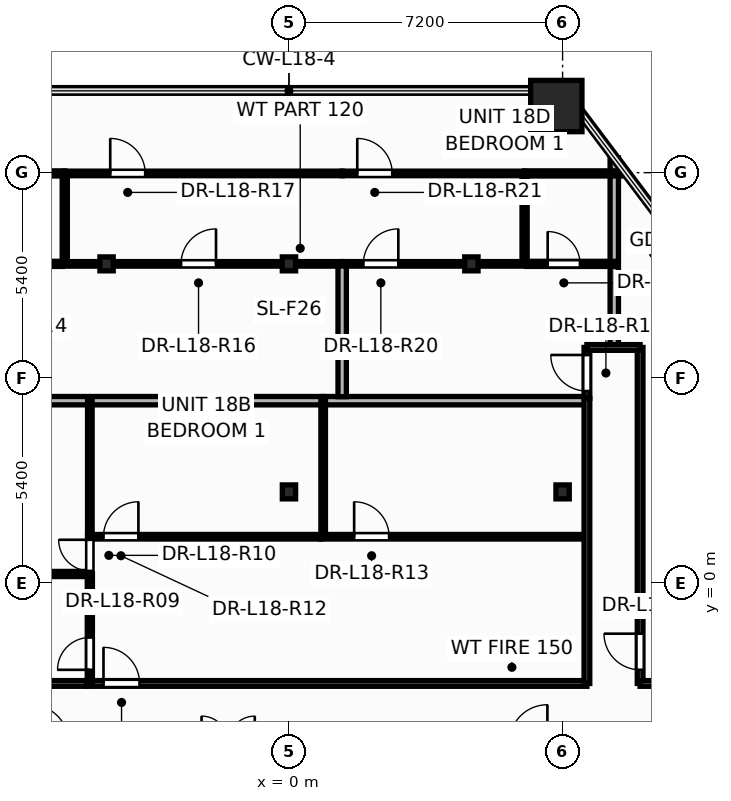
"""IFC4 building model, lengths in metres.
Left out: names, types, materials, properties, quantities, classifications, styles, units other than length and angle.
Written with IfcOpenShell. Run it as: python <this file> out.ifc"""

import sys

from ifc_helpers import new_model, si_unit, direction, frame, frame_2d, origin, origin_2d, place, context, subcontext, project, spatial, rectangle, hollow_rectangle, i_section, extrude, element, fill, save


model = new_model("IFC4")
c1 = context("Model", 3, precision=1e-05, world=origin(), true_north=direction((0.0, 1.0)))
c2 = subcontext(c1, "Body", "Model", "MODEL_VIEW")
j1 = project(units=[si_unit("LENGTHUNIT", "METRE"), si_unit("PLANEANGLEUNIT", "RADIAN")], contexts=[c1])
p1 = place(None, origin())
s1 = spatial("IfcSite", under=j1, at=p1, CompositionType="ELEMENT")
p2 = place(p1, origin())
s2 = spatial("IfcBuilding", under=s1, at=p2, CompositionType="ELEMENT")
p3 = place(p2, frame((0.0, 0.0, 72.0)))
s3 = spatial("IfcBuildingStorey", under=s2, at=p3, CompositionType="ELEMENT", Elevation=72.0)
p4 = place(p3, frame((7.034, 12.553, 0.0), z_axis=(0.0, 0.0, 1.0), x_axis=(1.0, 0.0, 0.0)))
e1 = element("IfcColumn", 1, at=p4, inside=s3, PredefinedType="COLUMN", context=c2, shape_type="SweptSolid", body=[
    extrude(hollow_rectangle(XDim=1.35, YDim=1.35, WallThickness=0.065, at=origin_2d()), origin(), (0.0, 0.0, 1.0), 3.6),
])
for number, where, z_axis, x_axis in (
    (2, (0.0, 2.4, 0.0), (0.0, 0.0, 1.0), (1.0, 0.0, 0.0)),
    (3, (7.2, 2.4, 0.0), (0.0, 0.0, 1.0), (1.0, 0.0, 0.0)),
    (4, (-4.8, 8.4, 0.0), (0.0, 0.0, 1.0), (1.0, 0.0, 0.0)),
    (5, (0.0, 8.4, 0.0), (0.0, 0.0, 1.0), (1.0, 0.0, 0.0)),
    (6, (4.8, 8.4, 0.0), (0.0, 0.0, 1.0), (1.0, 0.0, 0.0)),
):
    element("IfcColumn", number, at=place(p3, frame(where, z_axis=z_axis, x_axis=x_axis)), inside=s3, PredefinedType="COLUMN", context=c2, shape_type="SweptSolid", body=[
        extrude(i_section(OverallWidth=0.35, OverallDepth=0.367, WebThickness=0.025, FlangeThickness=0.032, at=origin_2d()), origin(), (0.0, 0.0, 1.0), 3.6),
    ])
p5 = place(p3, frame((-5.32, -2.64, 0.0), z_axis=(0.0, 0.0, 1.0), x_axis=(1.0, 0.0, 0.0)))
e7 = element("IfcWall", 7, at=p5, inside=s3, PredefinedType="PARTITIONING", context=c2, shape_type="SweptSolid", body=[
    extrude(rectangle(XDim=13.16, YDim=0.15, at=frame_2d((6.58, 0.0))), origin(), (0.0, 0.0, 1.0), 2.325),
])
p6 = place(p5, frame((0.439, 0.0, 0.0)))
e8 = element("IfcOpeningElement", 8, at=p6, cuts=e7, PredefinedType="OPENING", context=c2, shape_type="SweptSolid", body=[
    extrude(rectangle(XDim=0.956, YDim=2.104, at=frame_2d((0.475, 1.052))), frame((0.0, 0.085, 0.0), z_axis=(0.0, -1.0, 0.0), x_axis=(1.0, 0.0, 0.0)), (0.0, 0.0, 1.0), 0.17),
])
p7 = place(p3, frame((9.24, -2.64, 0.0), z_axis=(0.0, 0.0, 1.0), x_axis=(0.0, 1.0, 0.0)))
e9 = element("IfcWall", 9, at=p7, inside=s3, PredefinedType="PARTITIONING", context=c2, shape_type="SweptSolid", body=[
    extrude(rectangle(XDim=8.84, YDim=0.15, at=frame_2d((4.42, 0.0))), origin(), (0.0, 0.0, 1.0), 2.509),
])
p8 = place(p7, frame((0.359, 0.0, 0.0)))
e10 = element("IfcOpeningElement", 10, at=p8, cuts=e9, PredefinedType="OPENING", context=c2, shape_type="SweptSolid", body=[
    extrude(rectangle(XDim=0.956, YDim=2.104, at=frame_2d((0.475, 1.052))), frame((0.0, 0.085, 0.0), z_axis=(0.0, -1.0, 0.0), x_axis=(1.0, 0.0, 0.0)), (0.0, 0.0, 1.0), 0.17),
])
p9 = place(p3, frame((-5.96, 8.4, 0.0), z_axis=(0.0, 0.0, 1.0), x_axis=(1.0, 0.0, 0.0)))
e11 = element("IfcWall", 11, at=p9, inside=s3, PredefinedType="PARTITIONING", context=c2, shape_type="SweptSolid", body=[
    extrude(rectangle(XDim=7.36, YDim=0.12, at=frame_2d((3.68, 0.0))), origin(), (0.0, 0.0, 1.0), 2.325),
])
p10 = place(p9, frame((3.12, 0.0, 0.0)))
e12 = element("IfcOpeningElement", 12, at=p10, cuts=e11, PredefinedType="OPENING", context=c2, shape_type="SweptSolid", body=[
    extrude(rectangle(XDim=0.926, YDim=2.104, at=frame_2d((0.46, 1.052))), frame((0.0, 0.07, 0.0), z_axis=(0.0, -1.0, 0.0), x_axis=(1.0, 0.0, 0.0)), (0.0, 0.0, 1.0), 0.14),
])
p11 = place(p3, frame((-5.9, 10.78, 0.0), z_axis=(0.0, 0.0, 1.0), x_axis=(1.0, 0.0, 0.0)))
e13 = element("IfcWall", 13, at=p11, inside=s3, PredefinedType="PARTITIONING", context=c2, shape_type="SweptSolid", body=[
    extrude(rectangle(XDim=7.3, YDim=0.12, at=frame_2d((3.65, 0.0))), origin(), (0.0, 0.0, 1.0), 2.509),
])
p12 = place(p11, frame((1.197, 0.0, 0.0)))
e14 = element("IfcOpeningElement", 14, at=p12, cuts=e13, PredefinedType="OPENING", context=c2, shape_type="SweptSolid", body=[
    extrude(rectangle(XDim=0.926, YDim=2.104, at=frame_2d((0.46, 1.052))), frame((0.0, 0.07, 0.0), z_axis=(0.0, -1.0, 0.0), x_axis=(1.0, 0.0, 0.0)), (0.0, 0.0, 1.0), 0.14),
])
p13 = place(p3, frame((0.84, 1.22, 0.0), z_axis=(0.0, 0.0, 1.0), x_axis=(1.0, 0.0, 0.0)))
e15 = element("IfcWall", 15, at=p13, inside=s3, PredefinedType="PARTITIONING", context=c2, shape_type="SweptSolid", body=[
    extrude(rectangle(XDim=7.0, YDim=0.12, at=frame_2d((3.5, 0.0))), origin(), (0.0, 0.0, 1.0), 2.325),
])
p14 = place(p13, frame((0.875, 0.0, 0.0)))
e16 = element("IfcOpeningElement", 16, at=p14, cuts=e15, PredefinedType="OPENING", context=c2, shape_type="SweptSolid", body=[
    extrude(rectangle(XDim=0.926, YDim=2.104, at=frame_2d((0.46, 1.052))), frame((0.0, 0.07, 0.0), z_axis=(0.0, -1.0, 0.0), x_axis=(1.0, 0.0, 0.0)), (0.0, 0.0, 1.0), 0.14),
])
p15 = place(p3, frame((0.9, 4.8, 0.0), z_axis=(0.0, 0.0, 1.0), x_axis=(1.0, 0.0, 0.0)))
e17 = element("IfcWall", 17, at=p15, inside=s3, PredefinedType="PARTITIONING", context=c2, shape_type="SweptSolid", body=[
    extrude(rectangle(XDim=6.94, YDim=0.22, at=frame_2d((3.47, 0.0))), origin(), (0.0, 0.0, 1.0), 2.509),
])
p16 = place(p3, frame((-5.24, 1.22, 0.0), z_axis=(0.0, 0.0, 1.0), x_axis=(1.0, 0.0, 0.0)))
e18 = element("IfcWall", 18, at=p16, inside=s3, PredefinedType="PARTITIONING", context=c2, shape_type="SweptSolid", body=[
    extrude(rectangle(XDim=6.078, YDim=0.12, at=frame_2d((3.039, 0.0))), origin(), (0.0, 0.0, 1.0), 2.325),
])
p17 = place(p16, frame((0.358, 0.0, 0.0)))
e19 = element("IfcOpeningElement", 19, at=p17, cuts=e18, PredefinedType="OPENING", context=c2, shape_type="SweptSolid", body=[
    extrude(rectangle(XDim=0.926, YDim=2.104, at=frame_2d((0.46, 1.052))), frame((0.0, 0.07, 0.0), z_axis=(0.0, -1.0, 0.0), x_axis=(1.0, 0.0, 0.0)), (0.0, 0.0, 1.0), 0.14),
])
p18 = place(p3, frame((-7.84, 4.8, 0.0), z_axis=(0.0, 0.0, 1.0), x_axis=(1.0, 0.0, 0.0)))
e20 = element("IfcWall", 20, at=p18, inside=s3, PredefinedType="PARTITIONING", context=c2, shape_type="SweptSolid", body=[
    extrude(rectangle(XDim=8.74, YDim=0.22, at=frame_2d((4.37, 0.0))), origin(), (0.0, 0.0, 1.0), 2.325),
])
p19 = place(p3, frame((9.24, -2.64, 0.0), z_axis=(0.0, 0.0, 1.0), x_axis=(1.0, 0.0, 0.0)))
e21 = element("IfcWall", 21, at=p19, inside=s3, PredefinedType="PARTITIONING", context=c2, shape_type="SweptSolid", body=[
    extrude(rectangle(XDim=5.4, YDim=0.15, at=frame_2d((2.7, 0.0))), origin(), (0.0, 0.0, 1.0), 3.35),
])
p20 = place(p3, frame((1.4, 8.4, 0.0), z_axis=(0.0, 0.0, 1.0), x_axis=(1.0, 0.0, 0.0)))
e22 = element("IfcWall", 22, at=p20, inside=s3, PredefinedType="PARTITIONING", context=c2, shape_type="SweptSolid", body=[
    extrude(rectangle(XDim=4.86, YDim=0.12, at=frame_2d((2.43, 0.0))), origin(), (0.0, 0.0, 1.0), 2.509),
])
p21 = place(p20, frame((0.558, 0.0, 0.0)))
e23 = element("IfcOpeningElement", 23, at=p21, cuts=e22, PredefinedType="OPENING", context=c2, shape_type="SweptSolid", body=[
    extrude(rectangle(XDim=0.926, YDim=2.104, at=frame_2d((0.46, 1.052))), frame((0.0, 0.07, 0.0), z_axis=(0.0, -1.0, 0.0), x_axis=(1.0, 0.0, 0.0)), (0.0, 0.0, 1.0), 0.14),
])
p22 = place(p3, frame((1.4, 10.78, 0.0), z_axis=(0.0, 0.0, 1.0), x_axis=(1.0, 0.0, 0.0)))
e24 = element("IfcWall", 24, at=p22, inside=s3, PredefinedType="PARTITIONING", context=c2, shape_type="SweptSolid", body=[
    extrude(rectangle(XDim=4.8, YDim=0.12, at=frame_2d((2.4, 0.0))), origin(), (0.0, 0.0, 1.0), 2.509),
])
p23 = place(p22, frame((0.397, 0.0, 0.0)))
e25 = element("IfcOpeningElement", 25, at=p23, cuts=e24, PredefinedType="OPENING", context=c2, shape_type="SweptSolid", body=[
    extrude(rectangle(XDim=0.926, YDim=2.104, at=frame_2d((0.46, 1.052))), frame((0.0, 0.07, 0.0), z_axis=(0.0, -1.0, 0.0), x_axis=(1.0, 0.0, 0.0)), (0.0, 0.0, 1.0), 0.14),
])
p24 = place(p3, frame((7.84, -2.64, 0.0), z_axis=(0.0, 0.0, 1.0), x_axis=(0.0, 1.0, 0.0)))
e26 = element("IfcWall", 26, at=p24, inside=s3, PredefinedType="PARTITIONING", context=c2, shape_type="SweptSolid", body=[
    extrude(rectangle(XDim=7.5, YDim=0.15, at=frame_2d((3.75, 0.0))), origin(), (0.0, 0.0, 1.0), 2.509),
])
p25 = place(p3, frame((-5.24, 1.16, 0.0), z_axis=(0.0, 0.0, 1.0), x_axis=(0.0, 1.0, 0.0)))
e27 = element("IfcWall", 27, at=p25, inside=s3, PredefinedType="PARTITIONING", context=c2, shape_type="SweptSolid", body=[
    extrude(rectangle(XDim=3.64, YDim=0.12, at=frame_2d((1.82, 0.0))), origin(), (0.0, 0.0, 1.0), 2.325),
])
p26 = place(p3, frame((1.4, 4.905, 0.0), z_axis=(0.0, 0.0, 1.0), x_axis=(0.0, 1.0, 0.0)))
e28 = element("IfcWall", 28, at=p26, inside=s3, PredefinedType="PARTITIONING", context=c2, shape_type="SweptSolid", body=[
    extrude(rectangle(XDim=3.44, YDim=0.22, at=frame_2d((1.72, 0.0))), origin(), (0.0, 0.0, 1.0), 2.509),
])
p27 = place(p3, frame((0.9, 1.22, 0.0), z_axis=(0.0, 0.0, 1.0), x_axis=(0.0, 1.0, 0.0)))
e29 = element("IfcWall", 29, at=p27, inside=s3, PredefinedType="PARTITIONING", context=c2, shape_type="SweptSolid", body=[
    extrude(rectangle(XDim=3.58, YDim=0.12, at=frame_2d((1.79, 0.0))), origin(), (0.0, 0.0, 1.0), 2.325),
])
p28 = place(p3, frame((-8.869, 10.78, 0.0), z_axis=(0.0, 0.0, 1.0), x_axis=(1.0, 0.0, 0.0)))
e30 = element("IfcWall", 30, at=p28, inside=s3, PredefinedType="PARTITIONING", context=c2, shape_type="SweptSolid", body=[
    extrude(rectangle(XDim=2.969, YDim=0.135, at=frame_2d((1.484, 0.0))), origin(), (0.0, 0.0, 1.0), 2.509),
])
p29 = place(p3, frame((-5.24, -2.64, 0.0), z_axis=(0.0, 0.0, 1.0), x_axis=(0.0, 1.0, 0.0)))
e31 = element("IfcWall", 31, at=p29, inside=s3, PredefinedType="PARTITIONING", context=c2, shape_type="SweptSolid", body=[
    extrude(rectangle(XDim=2.88, YDim=0.135, at=frame_2d((1.44, 0.0))), origin(), (0.0, 0.0, 1.0), 3.35),
])
p30 = place(p29, frame((0.359, 0.0, 0.0)))
e32 = element("IfcOpeningElement", 32, at=p30, cuts=e31, PredefinedType="OPENING", context=c2, shape_type="SweptSolid", body=[
    extrude(rectangle(XDim=0.856, YDim=2.104, at=frame_2d((0.425, 1.052))), frame((0.0, 0.078, 0.0), z_axis=(0.0, -1.0, 0.0), x_axis=(1.0, 0.0, 0.0)), (0.0, 0.0, 1.0), 0.155),
])
p31 = place(p3, frame((8.56, 6.2, 0.0), z_axis=(0.0, 0.0, 1.0), x_axis=(0.0, 1.0, 0.0)))
e33 = element("IfcWall", 33, at=p31, inside=s3, PredefinedType="PARTITIONING", context=c2, shape_type="SweptSolid", body=[
    extrude(rectangle(XDim=4.991, YDim=0.22, at=frame_2d((2.495, 0.0))), origin(), (0.0, 0.0, 1.0), 2.509),
])
p32 = place(p3, frame((-8.56, 8.4, 0.0), z_axis=(0.0, 0.0, 1.0), x_axis=(1.0, 0.0, 0.0)))
e34 = element("IfcWall", 34, at=p32, inside=s3, PredefinedType="PARTITIONING", context=c2, shape_type="SweptSolid", body=[
    extrude(rectangle(XDim=2.598, YDim=0.135, at=frame_2d((1.299, 0.0))), origin(), (0.0, 0.0, 1.0), 3.35),
])
p33 = place(p32, frame((0.398, 0.0, 0.0)))
e35 = element("IfcOpeningElement", 35, at=p33, cuts=e34, PredefinedType="OPENING", context=c2, shape_type="SweptSolid", body=[
    extrude(rectangle(XDim=0.856, YDim=2.104, at=frame_2d((0.425, 1.052))), frame((0.0, 0.078, 0.0), z_axis=(0.0, -1.0, 0.0), x_axis=(1.0, 0.0, 0.0)), (0.0, 0.0, 1.0), 0.155),
])
p34 = place(p3, frame((6.2, 10.78, 0.0), z_axis=(0.0, 0.0, 1.0), x_axis=(1.0, 0.0, 0.0)))
e36 = element("IfcWall", 36, at=p34, inside=s3, PredefinedType="PARTITIONING", context=c2, shape_type="SweptSolid", body=[
    extrude(rectangle(XDim=2.669, YDim=0.135, at=frame_2d((1.334, 0.0))), origin(), (0.0, 0.0, 1.0), 2.509),
])
p35 = place(p3, frame((-7.84, -2.64, 0.0), z_axis=(0.0, 0.0, 1.0), x_axis=(1.0, 0.0, 0.0)))
e37 = element("IfcWall", 37, at=p35, inside=s3, PredefinedType="PARTITIONING", context=c2, shape_type="SweptSolid", body=[
    extrude(rectangle(XDim=2.518, YDim=0.15, at=frame_2d((1.259, 0.0))), origin(), (0.0, 0.0, 1.0), 2.325),
])
p36 = place(p3, frame((-7.84, 0.24, 0.0), z_axis=(0.0, 0.0, 1.0), x_axis=(1.0, 0.0, 0.0)))
e38 = element("IfcWall", 38, at=p36, inside=s3, PredefinedType="PARTITIONING", context=c2, shape_type="SweptSolid", body=[
    extrude(rectangle(XDim=2.6, YDim=0.135, at=frame_2d((1.3, 0.0))), origin(), (0.0, 0.0, 1.0), 2.325),
])
p37 = place(p3, frame((6.262, 8.4, 0.0), z_axis=(0.0, 0.0, 1.0), x_axis=(1.0, 0.0, 0.0)))
e39 = element("IfcWall", 39, at=p37, inside=s3, PredefinedType="PARTITIONING", context=c2, shape_type="SweptSolid", body=[
    extrude(rectangle(XDim=2.298, YDim=0.135, at=frame_2d((1.149, 0.0))), origin(), (0.0, 0.0, 1.0), 3.35),
])
p38 = place(p37, frame((0.546, 0.0, 0.0)))
e40 = element("IfcOpeningElement", 40, at=p38, cuts=e39, PredefinedType="OPENING", context=c2, shape_type="SweptSolid", body=[
    extrude(rectangle(XDim=0.856, YDim=2.104, at=frame_2d((0.425, 1.052))), frame((0.0, 0.078, 0.0), z_axis=(0.0, -1.0, 0.0), x_axis=(1.0, 0.0, 0.0)), (0.0, 0.0, 1.0), 0.155),
])
for number, where, z_axis, x_axis in (
    (41, (-5.9, 8.4, 0.0), (0.0, 0.0, 1.0), (0.0, 1.0, 0.0)),
    (42, (6.2, 8.4, 0.0), (0.0, 0.0, 1.0), (0.0, 1.0, 0.0)),
):
    element("IfcWall", number, at=place(p3, frame(where, z_axis=z_axis, x_axis=x_axis)), inside=s3, PredefinedType="PARTITIONING", context=c2, shape_type="SweptSolid", body=[
        extrude(rectangle(XDim=2.38, YDim=0.135, at=frame_2d((1.19, 0.0))), origin(), (0.0, 0.0, 1.0), 2.509),
    ])
p39 = place(p3, frame((7.84, 4.862, 0.0), z_axis=(0.0, 0.0, 1.0), x_axis=(0.0, 1.0, 0.0)))
e43 = element("IfcWall", 43, at=p39, inside=s3, PredefinedType="PARTITIONING", context=c2, shape_type="SweptSolid", body=[
    extrude(rectangle(XDim=1.338, YDim=0.15, at=frame_2d((0.669, 0.0))), origin(), (0.0, 0.0, 1.0), 3.35),
])
p40 = place(p39, frame((0.191, 0.0, 0.0)))
e44 = element("IfcOpeningElement", 44, at=p40, cuts=e43, PredefinedType="OPENING", context=c2, shape_type="SweptSolid", body=[
    extrude(rectangle(XDim=0.956, YDim=2.104, at=frame_2d((0.475, 1.052))), frame((0.0, 0.085, 0.0), z_axis=(0.0, -1.0, 0.0), x_axis=(1.0, 0.0, 0.0)), (0.0, 0.0, 1.0), 0.17),
])
p41 = place(p3, frame((-5.24, 0.24, 0.0), z_axis=(0.0, 0.0, 1.0), x_axis=(0.0, 1.0, 0.0)))
e45 = element("IfcWall", 45, at=p41, inside=s3, PredefinedType="PARTITIONING", context=c2, shape_type="SweptSolid", body=[
    extrude(rectangle(XDim=1.04, YDim=0.12, at=frame_2d((0.52, 0.0))), origin(), (0.0, 0.0, 1.0), 3.35),
])
p42 = place(p41, frame((0.08, 0.0, 0.0)))
e46 = element("IfcOpeningElement", 46, at=p42, cuts=e45, PredefinedType="OPENING", context=c2, shape_type="SweptSolid", body=[
    extrude(rectangle(XDim=0.826, YDim=2.104, at=frame_2d((0.41, 1.052))), frame((0.0, 0.07, 0.0), z_axis=(0.0, -1.0, 0.0), x_axis=(1.0, 0.0, 0.0)), (0.0, 0.0, 1.0), 0.14),
])
p43 = place(p3, frame((7.84, 6.2, 0.0), z_axis=(0.0, 0.0, 1.0), x_axis=(1.0, 0.0, 0.0)))
e47 = element("IfcWall", 47, at=p43, inside=s3, PredefinedType="PARTITIONING", context=c2, shape_type="SweptSolid", body=[
    extrude(rectangle(XDim=1.4, YDim=0.15, at=frame_2d((0.7, 0.0))), origin(), (0.0, 0.0, 1.0), 3.35),
])
p44 = place(p30, origin())
e48 = element("IfcDoor", 48, at=p44, inside=s3, OperationType="SINGLE_SWING_LEFT", PredefinedType="DOOR", context=c2, shape_type="SweptSolid", body=[
    extrude(rectangle(XDim=0.85, YDim=2.1, at=frame_2d((0.425, 1.05))), frame((0.0, 0.025, 0.0), z_axis=(0.0, -1.0, 0.0), x_axis=(1.0, 0.0, 0.0)), (0.0, 0.0, 1.0), 0.05),
])
fill(e32, e48)
p45 = place(p42, origin())
e49 = element("IfcDoor", 49, at=p45, inside=s3, OperationType="SINGLE_SWING_RIGHT", PredefinedType="DOOR", context=c2, shape_type="SweptSolid", body=[
    extrude(rectangle(XDim=0.82, YDim=2.1, at=frame_2d((0.41, 1.05))), frame((0.0, 0.025, 0.0), z_axis=(0.0, -1.0, 0.0), x_axis=(1.0, 0.0, 0.0)), (0.0, 0.0, 1.0), 0.05),
])
fill(e46, e49)
p46 = place(p6, origin())
e50 = element("IfcDoor", 50, at=p46, inside=s3, OperationType="SINGLE_SWING_LEFT", PredefinedType="DOOR", context=c2, shape_type="SweptSolid", body=[
    extrude(rectangle(XDim=0.95, YDim=2.1, at=frame_2d((0.475, 1.05))), frame((0.0, 0.025, 0.0), z_axis=(0.0, -1.0, 0.0), x_axis=(1.0, 0.0, 0.0)), (0.0, 0.0, 1.0), 0.05),
])
fill(e8, e50)
p47 = place(p17, origin())
e51 = element("IfcDoor", 51, at=p47, inside=s3, OperationType="SINGLE_SWING_RIGHT", PredefinedType="DOOR", context=c2, shape_type="SweptSolid", body=[
    extrude(rectangle(XDim=0.92, YDim=2.1, at=frame_2d((0.46, 1.05))), frame((0.0, 0.025, 0.0), z_axis=(0.0, -1.0, 0.0), x_axis=(1.0, 0.0, 0.0)), (0.0, 0.0, 1.0), 0.05),
])
fill(e19, e51)
p48 = place(p14, origin())
e52 = element("IfcDoor", 52, at=p48, inside=s3, OperationType="SINGLE_SWING_LEFT", PredefinedType="DOOR", context=c2, shape_type="SweptSolid", body=[
    extrude(rectangle(XDim=0.92, YDim=2.1, at=frame_2d((0.46, 1.05))), frame((0.0, 0.025, 0.0), z_axis=(0.0, -1.0, 0.0), x_axis=(1.0, 0.0, 0.0)), (0.0, 0.0, 1.0), 0.05),
])
fill(e16, e52)
p49 = place(p10, origin())
e53 = element("IfcDoor", 53, at=p49, inside=s3, OperationType="SINGLE_SWING_RIGHT", PredefinedType="DOOR", context=c2, shape_type="SweptSolid", body=[
    extrude(rectangle(XDim=0.92, YDim=2.1, at=frame_2d((0.46, 1.05))), frame((0.0, 0.025, 0.0), z_axis=(0.0, -1.0, 0.0), x_axis=(1.0, 0.0, 0.0)), (0.0, 0.0, 1.0), 0.05),
])
fill(e12, e53)
p50 = place(p12, origin())
e54 = element("IfcDoor", 54, at=p50, inside=s3, OperationType="SINGLE_SWING_LEFT", PredefinedType="DOOR", context=c2, shape_type="SweptSolid", body=[
    extrude(rectangle(XDim=0.92, YDim=2.1, at=frame_2d((0.46, 1.05))), frame((0.0, 0.025, 0.0), z_axis=(0.0, -1.0, 0.0), x_axis=(1.0, 0.0, 0.0)), (0.0, 0.0, 1.0), 0.05),
])
fill(e14, e54)
p51 = place(p40, origin())
e55 = element("IfcDoor", 55, at=p51, inside=s3, OperationType="SINGLE_SWING_RIGHT", PredefinedType="DOOR", context=c2, shape_type="SweptSolid", body=[
    extrude(rectangle(XDim=0.95, YDim=2.1, at=frame_2d((0.475, 1.05))), frame((0.0, 0.025, 0.0), z_axis=(0.0, -1.0, 0.0), x_axis=(1.0, 0.0, 0.0)), (0.0, 0.0, 1.0), 0.05),
])
fill(e44, e55)
p52 = place(p38, origin())
e56 = element("IfcDoor", 56, at=p52, inside=s3, OperationType="SINGLE_SWING_LEFT", PredefinedType="DOOR", context=c2, shape_type="SweptSolid", body=[
    extrude(rectangle(XDim=0.85, YDim=2.1, at=frame_2d((0.425, 1.05))), frame((0.0, 0.025, 0.0), z_axis=(0.0, -1.0, 0.0), x_axis=(1.0, 0.0, 0.0)), (0.0, 0.0, 1.0), 0.05),
])
fill(e40, e56)
p53 = place(p21, origin())
e57 = element("IfcDoor", 57, at=p53, inside=s3, OperationType="SINGLE_SWING_RIGHT", PredefinedType="DOOR", context=c2, shape_type="SweptSolid", body=[
    extrude(rectangle(XDim=0.92, YDim=2.1, at=frame_2d((0.46, 1.05))), frame((0.0, 0.025, 0.0), z_axis=(0.0, -1.0, 0.0), x_axis=(1.0, 0.0, 0.0)), (0.0, 0.0, 1.0), 0.05),
])
fill(e23, e57)
p54 = place(p23, origin())
e58 = element("IfcDoor", 58, at=p54, inside=s3, OperationType="SINGLE_SWING_LEFT", PredefinedType="DOOR", context=c2, shape_type="SweptSolid", body=[
    extrude(rectangle(XDim=0.92, YDim=2.1, at=frame_2d((0.46, 1.05))), frame((0.0, 0.025, 0.0), z_axis=(0.0, -1.0, 0.0), x_axis=(1.0, 0.0, 0.0)), (0.0, 0.0, 1.0), 0.05),
])
fill(e25, e58)
p55 = place(p8, origin())
e59 = element("IfcDoor", 59, at=p55, inside=s3, OperationType="SINGLE_SWING_RIGHT", PredefinedType="DOOR", context=c2, shape_type="SweptSolid", body=[
    extrude(rectangle(XDim=0.95, YDim=2.1, at=frame_2d((0.475, 1.05))), frame((0.0, 0.025, 0.0), z_axis=(0.0, -1.0, 0.0), x_axis=(1.0, 0.0, 0.0)), (0.0, 0.0, 1.0), 0.05),
])
fill(e10, e59)
save(model, sys.argv[1])
